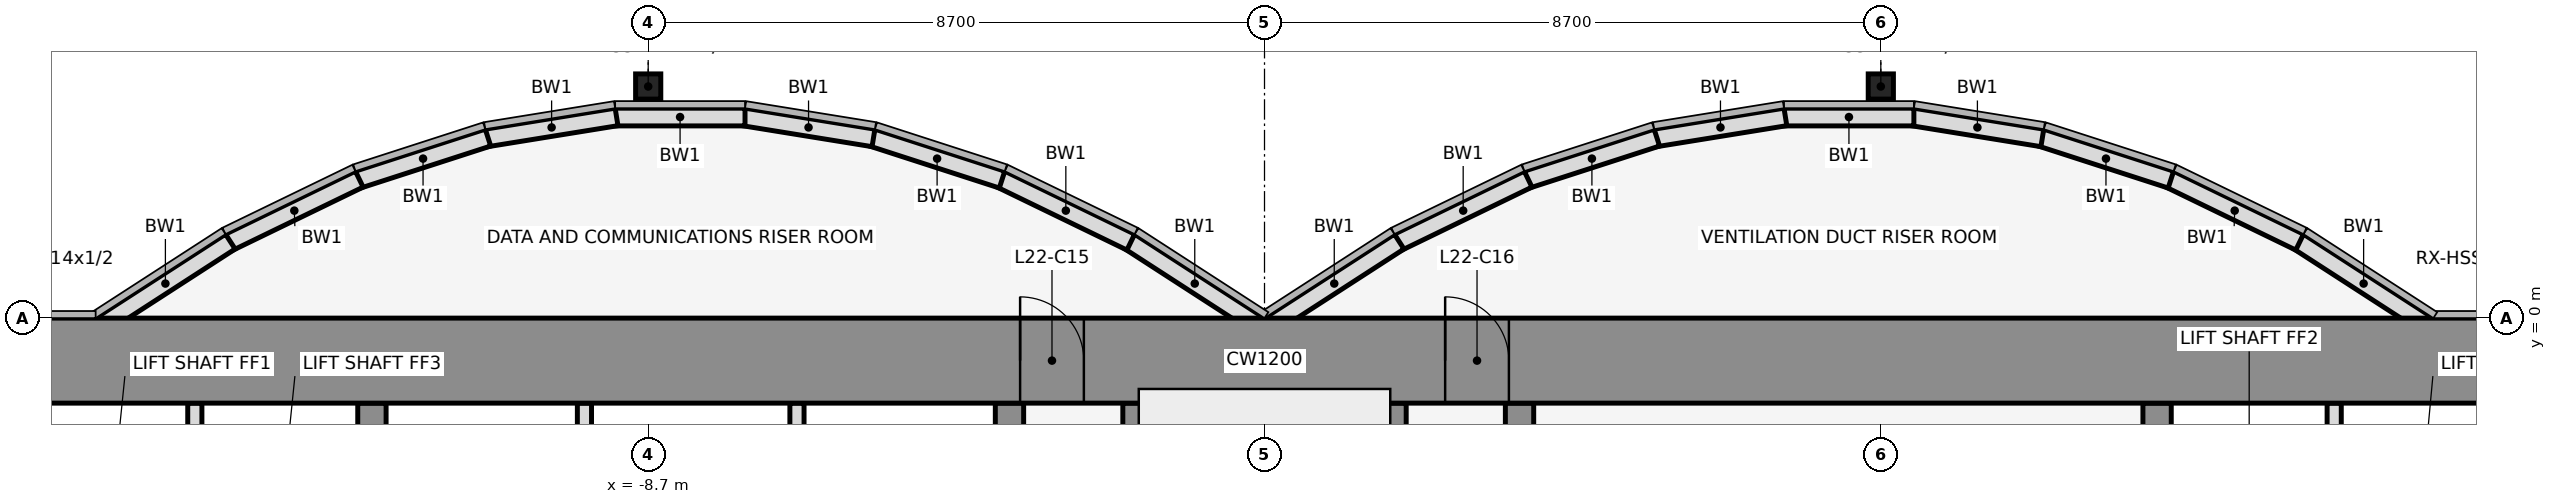
"""IFC4 building model, lengths in metres.
Left out: names, types, materials, properties, quantities, classifications, styles, units other than length and angle.
Written with IfcOpenShell. Run it as: python <this file> out.ifc"""

import sys

from ifc_helpers import new_model, si_unit, direction, frame, frame_2d, origin, origin_2d, place, context, subcontext, project, spatial, rectangle, hollow_rectangle, extrude, element, fill, save


model = new_model("IFC4")
c1 = context("Model", 3, precision=1e-05, world=origin(), true_north=direction((0.0, 1.0)))
c2 = subcontext(c1, "Body", "Model", "MODEL_VIEW")
j1 = project(units=[si_unit("LENGTHUNIT", "METRE"), si_unit("PLANEANGLEUNIT", "RADIAN")], contexts=[c1])
p1 = place(None, origin())
s1 = spatial("IfcSite", under=j1, at=p1, CompositionType="ELEMENT")
p2 = place(p1, origin())
s2 = spatial("IfcBuilding", under=s1, at=p2, CompositionType="ELEMENT")
p3 = place(p2, frame((0.0, 0.0, 106.3)))
s3 = spatial("IfcBuildingStorey", under=s2, at=p3, CompositionType="ELEMENT", Elevation=106.3)
for number, where, z_axis, x_axis in (
    (1, (-8.7, 3.269, 0.0), (0.0, 0.0, 1.0), (1.0, 0.0, 0.0)),
    (2, (8.7, 3.269, 0.0), (0.0, 0.0, 1.0), (1.0, 0.0, 0.0)),
):
    element("IfcColumn", number, at=place(p3, frame(where, z_axis=z_axis, x_axis=x_axis)), inside=s3, PredefinedType="COLUMN", context=c2, shape_type="SweptSolid", body=[
        extrude(hollow_rectangle(XDim=0.356, YDim=0.356, WallThickness=0.012, at=origin_2d()), origin(), (0.0, 0.0, 1.0), 4.1),
    ])
p4 = place(p3, frame((16.432, -0.105, 0.0), z_axis=(0.0, 0.0, 1.0), x_axis=(-0.83981312244, 0.542875602121, 0.0)))
e3 = element("IfcWall", 3, at=p4, inside=s3, PredefinedType="STANDARD", context=c2, shape_type="SweptSolid", body=[
    extrude(rectangle(XDim=2.183, YDim=0.25, at=frame_2d((1.091, 0.0))), origin(), (0.0, 0.0, 1.0), 3.95),
])
p5 = place(p3, frame((14.612, 1.073, 0.0), z_axis=(0.0, 0.0, 1.0), x_axis=(-0.89982408427, 0.436252928206, 0.0)))
e4 = element("IfcWall", 4, at=p5, inside=s3, PredefinedType="STANDARD", context=c2, shape_type="SweptSolid", body=[
    extrude(rectangle(XDim=2.038, YDim=0.25, at=frame_2d((1.019, 0.0))), origin(), (0.0, 0.0, 1.0), 3.95),
])
p6 = place(p3, frame((12.795, 1.955, 0.0), z_axis=(0.0, 0.0, 1.0), x_axis=(-0.951495806175, 0.307661714928, 0.0)))
e5 = element("IfcWall", 5, at=p6, inside=s3, PredefinedType="STANDARD", context=c2, shape_type="SweptSolid", body=[
    extrude(rectangle(XDim=1.927, YDim=0.25, at=frame_2d((0.963, 0.0))), origin(), (0.0, 0.0, 1.0), 3.95),
])
p7 = place(p3, frame((10.98, 2.543, 0.0), z_axis=(0.0, 0.0, 1.0), x_axis=(-0.987181718931, 0.159600293885, 0.0)))
e6 = element("IfcWall", 6, at=p7, inside=s3, PredefinedType="STANDARD", context=c2, shape_type="SweptSolid", body=[
    extrude(rectangle(XDim=1.857, YDim=0.25, at=frame_2d((0.929, 0.0))), origin(), (0.0, 0.0, 1.0), 3.95),
])
p8 = place(p3, frame((9.167, 2.838, 0.0), z_axis=(0.0, 0.0, 1.0), x_axis=(-1.0, 0.0, 0.0)))
e7 = element("IfcWall", 7, at=p8, inside=s3, PredefinedType="STANDARD", context=c2, shape_type="SweptSolid", body=[
    extrude(rectangle(XDim=1.833, YDim=0.25, at=frame_2d((0.917, 0.0))), origin(), (0.0, 0.0, 1.0), 3.95),
])
p9 = place(p3, frame((7.353, 2.84, 0.0), z_axis=(0.0, 0.0, 1.0), x_axis=(-0.987181718931, -0.159600293885, 0.0)))
e8 = element("IfcWall", 8, at=p9, inside=s3, PredefinedType="STANDARD", context=c2, shape_type="SweptSolid", body=[
    extrude(rectangle(XDim=1.857, YDim=0.25, at=frame_2d((0.929, 0.0))), origin(), (0.0, 0.0, 1.0), 3.95),
])
p10 = place(p3, frame((5.538, 2.548, 0.0), z_axis=(0.0, 0.0, 1.0), x_axis=(-0.951495806175, -0.307661714928, 0.0)))
e9 = element("IfcWall", 9, at=p10, inside=s3, PredefinedType="STANDARD", context=c2, shape_type="SweptSolid", body=[
    extrude(rectangle(XDim=1.927, YDim=0.25, at=frame_2d((0.963, 0.0))), origin(), (0.0, 0.0, 1.0), 3.95),
])
p11 = place(p3, frame((3.721, 1.962, 0.0), z_axis=(0.0, 0.0, 1.0), x_axis=(-0.89982408427, -0.436252928206, 0.0)))
e10 = element("IfcWall", 10, at=p11, inside=s3, PredefinedType="STANDARD", context=c2, shape_type="SweptSolid", body=[
    extrude(rectangle(XDim=2.038, YDim=0.25, at=frame_2d((1.019, 0.0))), origin(), (0.0, 0.0, 1.0), 3.95),
])
for number, where, z_axis, x_axis in (
    (11, (1.901, 1.08, 0.0), (0.0, 0.0, 1.0), (-0.84, -0.543, 0.0)),
    (12, (-0.068, -0.105, 0.0), (0.0, 0.0, 1.0), (-0.84, 0.543, 0.0)),
):
    element("IfcWall", number, at=place(p3, frame(where, z_axis=z_axis, x_axis=x_axis)), inside=s3, PredefinedType="STANDARD", context=c2, shape_type="SweptSolid", body=[
        extrude(rectangle(XDim=2.183, YDim=0.25, at=frame_2d((1.091, 0.0))), origin(), (0.0, 0.0, 1.0), 3.95),
    ])
p12 = place(p3, frame((-1.888, 1.073, 0.0), z_axis=(0.0, 0.0, 1.0), x_axis=(-0.89982408427, 0.436252928206, 0.0)))
e13 = element("IfcWall", 13, at=p12, inside=s3, PredefinedType="STANDARD", context=c2, shape_type="SweptSolid", body=[
    extrude(rectangle(XDim=2.038, YDim=0.25, at=frame_2d((1.019, 0.0))), origin(), (0.0, 0.0, 1.0), 3.95),
])
p13 = place(p3, frame((-3.705, 1.955, 0.0), z_axis=(0.0, 0.0, 1.0), x_axis=(-0.951495806175, 0.307661714928, 0.0)))
e14 = element("IfcWall", 14, at=p13, inside=s3, PredefinedType="STANDARD", context=c2, shape_type="SweptSolid", body=[
    extrude(rectangle(XDim=1.927, YDim=0.25, at=frame_2d((0.963, 0.0))), origin(), (0.0, 0.0, 1.0), 3.95),
])
p14 = place(p3, frame((-5.52, 2.543, 0.0), z_axis=(0.0, 0.0, 1.0), x_axis=(-0.987181718931, 0.159600293885, 0.0)))
e15 = element("IfcWall", 15, at=p14, inside=s3, PredefinedType="STANDARD", context=c2, shape_type="SweptSolid", body=[
    extrude(rectangle(XDim=1.857, YDim=0.25, at=frame_2d((0.929, 0.0))), origin(), (0.0, 0.0, 1.0), 3.95),
])
p15 = place(p3, frame((-7.333, 2.838, 0.0), z_axis=(0.0, 0.0, 1.0), x_axis=(-1.0, 0.0, 0.0)))
e16 = element("IfcWall", 16, at=p15, inside=s3, PredefinedType="STANDARD", context=c2, shape_type="SweptSolid", body=[
    extrude(rectangle(XDim=1.833, YDim=0.25, at=frame_2d((0.917, 0.0))), origin(), (0.0, 0.0, 1.0), 3.95),
])
p16 = place(p3, frame((-9.147, 2.84, 0.0), z_axis=(0.0, 0.0, 1.0), x_axis=(-0.987181718931, -0.159600293885, 0.0)))
e17 = element("IfcWall", 17, at=p16, inside=s3, PredefinedType="STANDARD", context=c2, shape_type="SweptSolid", body=[
    extrude(rectangle(XDim=1.857, YDim=0.25, at=frame_2d((0.929, 0.0))), origin(), (0.0, 0.0, 1.0), 3.95),
])
p17 = place(p3, frame((-10.962, 2.548, 0.0), z_axis=(0.0, 0.0, 1.0), x_axis=(-0.951495806175, -0.307661714928, 0.0)))
e18 = element("IfcWall", 18, at=p17, inside=s3, PredefinedType="STANDARD", context=c2, shape_type="SweptSolid", body=[
    extrude(rectangle(XDim=1.927, YDim=0.25, at=frame_2d((0.963, 0.0))), origin(), (0.0, 0.0, 1.0), 3.95),
])
p18 = place(p3, frame((-12.779, 1.962, 0.0), z_axis=(0.0, 0.0, 1.0), x_axis=(-0.89982408427, -0.436252928206, 0.0)))
e19 = element("IfcWall", 19, at=p18, inside=s3, PredefinedType="STANDARD", context=c2, shape_type="SweptSolid", body=[
    extrude(rectangle(XDim=2.038, YDim=0.25, at=frame_2d((1.019, 0.0))), origin(), (0.0, 0.0, 1.0), 3.95),
])
p19 = place(p3, frame((-14.599, 1.08, 0.0), z_axis=(0.0, 0.0, 1.0), x_axis=(-0.83981312244, -0.542875602121, 0.0)))
e20 = element("IfcWall", 20, at=p19, inside=s3, PredefinedType="STANDARD", context=c2, shape_type="SweptSolid", body=[
    extrude(rectangle(XDim=2.183, YDim=0.25, at=frame_2d((1.091, 0.0))), origin(), (0.0, 0.0, 1.0), 3.95),
])
p20 = place(p3, frame((-15.1, -4.6, 0.0), z_axis=(0.0, 0.0, 1.0), x_axis=(0.0, 1.0, 0.0)))
e21 = element("IfcWall", 21, at=p20, inside=s3, PredefinedType="PARTITIONING", context=c2, shape_type="SweptSolid", body=[
    extrude(rectangle(XDim=3.4, YDim=0.2, at=frame_2d((1.7, 0.0))), origin(), (0.0, 0.0, 1.0), 3.018),
])
p21 = place(p3, frame((-12.6, -11.8, 0.0), z_axis=(0.0, 0.0, 1.0), x_axis=(0.0, 1.0, 0.0)))
e22 = element("IfcWall", 22, at=p21, inside=s3, PredefinedType="SHEAR", context=c2, shape_type="SweptSolid", body=[
    extrude(rectangle(XDim=10.6, YDim=0.4, at=frame_2d((5.3, 0.0))), origin(), (0.0, 0.0, 1.0), 4.1),
])
p22 = place(p21, frame((4.75, 0.0, 0.0)))
e23 = element("IfcOpeningElement", 23, at=p22, cuts=e22, PredefinedType="OPENING", context=c2, shape_type="SweptSolid", body=[
    extrude(rectangle(XDim=1.1, YDim=2.1, at=frame_2d((0.55, 1.05))), frame((0.0, 0.212, 0.0), z_axis=(0.0, -1.0, 0.0), x_axis=(1.0, 0.0, 0.0)), (0.0, 0.0, 1.0), 0.424),
])
for number, where, z_axis, x_axis in (
    (24, (-9.6, -4.6, 0.0), (0.0, 0.0, 1.0), (0.0, 1.0, 0.0)),
    (25, (-6.6, -4.6, 0.0), (0.0, 0.0, 1.0), (0.0, 1.0, 0.0)),
):
    element("IfcWall", number, at=place(p3, frame(where, z_axis=z_axis, x_axis=x_axis)), inside=s3, PredefinedType="PARTITIONING", context=c2, shape_type="SweptSolid", body=[
        extrude(rectangle(XDim=3.4, YDim=0.2, at=frame_2d((1.7, 0.0))), origin(), (0.0, 0.0, 1.0), 3.018),
    ])
p23 = place(p3, frame((-3.6, -11.8, 0.0), z_axis=(0.0, 0.0, 1.0), x_axis=(0.0, 1.0, 0.0)))
e26 = element("IfcWall", 26, at=p23, inside=s3, PredefinedType="SHEAR", context=c2, shape_type="SweptSolid", body=[
    extrude(rectangle(XDim=10.6, YDim=0.4, at=frame_2d((5.3, 0.0))), origin(), (0.0, 0.0, 1.0), 4.1),
])
p24 = place(p23, frame((4.85, 0.0, 0.0)))
e27 = element("IfcOpeningElement", 27, at=p24, cuts=e26, PredefinedType="OPENING", context=c2, shape_type="SweptSolid", body=[
    extrude(rectangle(XDim=0.9, YDim=2.1, at=frame_2d((0.45, 1.05))), frame((0.0, 0.212, 0.0), z_axis=(0.0, -1.0, 0.0), x_axis=(1.0, 0.0, 0.0)), (0.0, 0.0, 1.0), 0.424),
])
for number, where, z_axis, x_axis in (
    (28, (-1.8, -11.8, 0.0), (0.0, 0.0, 1.0), (0.0, 1.0, 0.0)),
    (29, (1.8, -11.8, 0.0), (0.0, 0.0, 1.0), (0.0, 1.0, 0.0)),
):
    element("IfcWall", number, at=place(p3, frame(where, z_axis=z_axis, x_axis=x_axis)), inside=s3, PredefinedType="SHEAR", context=c2, shape_type="SweptSolid", body=[
        extrude(rectangle(XDim=10.6, YDim=0.4, at=frame_2d((5.3, 0.0))), origin(), (0.0, 0.0, 1.0), 4.1),
    ])
p25 = place(p3, frame((3.6, -11.8, 0.0), z_axis=(0.0, 0.0, 1.0), x_axis=(0.0, 1.0, 0.0)))
e30 = element("IfcWall", 30, at=p25, inside=s3, PredefinedType="SHEAR", context=c2, shape_type="SweptSolid", body=[
    extrude(rectangle(XDim=10.6, YDim=0.4, at=frame_2d((5.3, 0.0))), origin(), (0.0, 0.0, 1.0), 4.1),
])
p26 = place(p25, frame((1.35, 0.0, 0.0)))
e31 = element("IfcOpeningElement", 31, at=p26, cuts=e30, PredefinedType="OPENING", context=c2, shape_type="SweptSolid", body=[
    extrude(rectangle(XDim=0.9, YDim=2.1, at=frame_2d((0.45, 1.05))), frame((0.0, 0.212, 0.0), z_axis=(0.0, -1.0, 0.0), x_axis=(1.0, 0.0, 0.0)), (0.0, 0.0, 1.0), 0.424),
])
p27 = place(p3, frame((12.6, -11.8, 0.0), z_axis=(0.0, 0.0, 1.0), x_axis=(0.0, 1.0, 0.0)))
e32 = element("IfcWall", 32, at=p27, inside=s3, PredefinedType="SHEAR", context=c2, shape_type="SweptSolid", body=[
    extrude(rectangle(XDim=10.6, YDim=0.4, at=frame_2d((5.3, 0.0))), origin(), (0.0, 0.0, 1.0), 4.1),
])
p28 = place(p27, frame((4.75, 0.0, 0.0)))
e33 = element("IfcOpeningElement", 33, at=p28, cuts=e32, PredefinedType="OPENING", context=c2, shape_type="SweptSolid", body=[
    extrude(rectangle(XDim=1.1, YDim=2.1, at=frame_2d((0.55, 1.05))), frame((0.0, 0.212, 0.0), z_axis=(0.0, -1.0, 0.0), x_axis=(1.0, 0.0, 0.0)), (0.0, 0.0, 1.0), 0.424),
])
p29 = place(p3, frame((15.1, -4.6, 0.0), z_axis=(0.0, 0.0, 1.0), x_axis=(0.0, 1.0, 0.0)))
e34 = element("IfcWall", 34, at=p29, inside=s3, PredefinedType="PARTITIONING", context=c2, shape_type="SweptSolid", body=[
    extrude(rectangle(XDim=3.4, YDim=0.2, at=frame_2d((1.7, 0.0))), origin(), (0.0, 0.0, 1.0), 3.018),
])
p30 = place(p3, frame((-22.0, -0.6, 0.0), z_axis=(0.0, 0.0, 1.0), x_axis=(1.0, 0.0, 0.0)))
e35 = element("IfcWall", 35, at=p30, inside=s3, PredefinedType="SHEAR", context=c2, shape_type="SweptSolid", body=[
    extrude(rectangle(XDim=44.0, YDim=1.2, at=frame_2d((22.0, 0.0))), origin(), (0.0, 0.0, 1.0), 4.1),
])
p31 = place(p30, frame((18.55, 0.0, 0.0)))
e36 = element("IfcOpeningElement", 36, at=p31, cuts=e35, PredefinedType="OPENING", context=c2, shape_type="SweptSolid", body=[
    extrude(rectangle(XDim=0.9, YDim=2.1, at=frame_2d((0.45, 1.05))), frame((0.0, 0.612, 0.0), z_axis=(0.0, -1.0, 0.0), x_axis=(1.0, 0.0, 0.0)), (0.0, 0.0, 1.0), 1.224),
])
p32 = place(p30, frame((24.55, 0.0, 0.0)))
e37 = element("IfcOpeningElement", 37, at=p32, cuts=e35, PredefinedType="OPENING", context=c2, shape_type="SweptSolid", body=[
    extrude(rectangle(XDim=0.9, YDim=2.1, at=frame_2d((0.45, 1.05))), frame((0.0, 0.612, 0.0), z_axis=(0.0, -1.0, 0.0), x_axis=(1.0, 0.0, 0.0)), (0.0, 0.0, 1.0), 1.224),
])
p33 = place(p31, origin())
e38 = element("IfcDoor", 38, at=p33, inside=s3, OperationType="SINGLE_SWING_LEFT", PredefinedType="DOOR", context=c2, shape_type="SweptSolid", body=[
    extrude(rectangle(XDim=0.9, YDim=2.1, at=frame_2d((0.45, 1.05))), frame((0.0, 0.025, 0.0), z_axis=(0.0, -1.0, 0.0), x_axis=(1.0, 0.0, 0.0)), (0.0, 0.0, 1.0), 0.05),
])
fill(e36, e38)
p34 = place(p32, origin())
e39 = element("IfcDoor", 39, at=p34, inside=s3, OperationType="SINGLE_SWING_LEFT", PredefinedType="DOOR", context=c2, shape_type="SweptSolid", body=[
    extrude(rectangle(XDim=0.9, YDim=2.1, at=frame_2d((0.45, 1.05))), frame((0.0, 0.025, 0.0), z_axis=(0.0, -1.0, 0.0), x_axis=(1.0, 0.0, 0.0)), (0.0, 0.0, 1.0), 0.05),
])
fill(e37, e39)
save(model, sys.argv[1])
